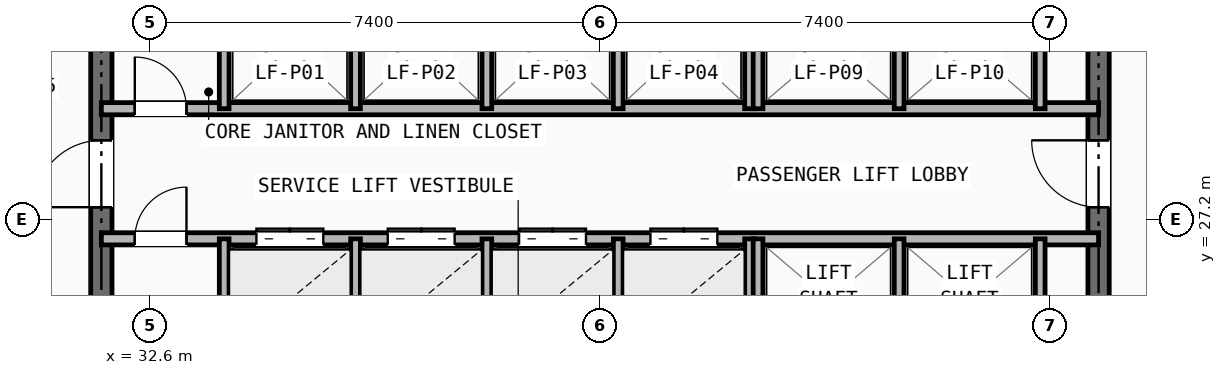
"""IFC4 building model, lengths in metres.
Left out: names, types, materials, properties, quantities, classifications, styles, units other than length and angle.
Written with IfcOpenShell. Run it as: python <this file> out.ifc"""

import sys

from ifc_helpers import new_model, si_unit, direction, frame, frame_2d, origin, place, context, subcontext, project, spatial, rectangle, extrude, element, fill, save


model = new_model("IFC4")
c1 = context("Model", 3, precision=1e-05, world=origin(), true_north=direction((0.0, 1.0)))
c2 = subcontext(c1, "Body", "Model", "MODEL_VIEW")
j1 = project(units=[si_unit("LENGTHUNIT", "METRE"), si_unit("PLANEANGLEUNIT", "RADIAN")], contexts=[c1])
p1 = place(None, origin())
s1 = spatial("IfcSite", under=j1, at=p1, CompositionType="ELEMENT")
p2 = place(p1, origin())
s2 = spatial("IfcBuilding", under=s1, at=p2, CompositionType="ELEMENT")
p3 = place(p2, frame((0.0, 0.0, 116.0)))
s3 = spatial("IfcBuildingStorey", under=s2, at=p3, CompositionType="ELEMENT", Elevation=116.0)
p4 = place(p3, frame((31.8, 16.4, 0.0), z_axis=(0.0, 0.0, 1.0), x_axis=(0.0, 1.0, 0.0)))
e1 = element("IfcWall", 1, at=p4, inside=s3, PredefinedType="SHEAR", context=c2, shape_type="SweptSolid", body=[
    extrude(rectangle(XDim=14.8, YDim=0.35, at=frame_2d((7.4, 0.0))), origin(), (0.0, 0.0, 1.0), 3.21),
])
p5 = place(p4, frame((11.0, 0.0, 0.0)))
e2 = element("IfcOpeningElement", 2, at=p5, cuts=e1, PredefinedType="OPENING", context=c2, shape_type="SweptSolid", body=[
    extrude(rectangle(XDim=1.1, YDim=2.15, at=frame_2d((0.55, 1.075))), frame((0.0, 0.185, 0.0), z_axis=(0.0, -1.0, 0.0), x_axis=(1.0, 0.0, 0.0)), (0.0, 0.0, 1.0), 0.37),
])
p6 = place(p3, frame((48.2, 16.4, 0.0), z_axis=(0.0, 0.0, 1.0), x_axis=(0.0, 1.0, 0.0)))
e3 = element("IfcWall", 3, at=p6, inside=s3, PredefinedType="SHEAR", context=c2, shape_type="SweptSolid", body=[
    extrude(rectangle(XDim=14.8, YDim=0.35, at=frame_2d((7.4, 0.0))), origin(), (0.0, 0.0, 1.0), 3.21),
])
p7 = place(p6, frame((11.0, 0.0, 0.0)))
e4 = element("IfcOpeningElement", 4, at=p7, cuts=e3, PredefinedType="OPENING", context=c2, shape_type="SweptSolid", body=[
    extrude(rectangle(XDim=1.1, YDim=2.15, at=frame_2d((0.55, 1.075))), frame((0.0, 0.185, 0.0), z_axis=(0.0, -1.0, 0.0), x_axis=(1.0, 0.0, 0.0)), (0.0, 0.0, 1.0), 0.37),
])
p8 = place(p3, frame((31.8, 29.02, 0.0), z_axis=(0.0, 0.0, 1.0), x_axis=(1.0, 0.0, 0.0)))
e5 = element("IfcWall", 5, at=p8, inside=s3, PredefinedType="SOLIDWALL", context=c2, shape_type="SweptSolid", body=[
    extrude(rectangle(XDim=16.4, YDim=0.2, at=frame_2d((8.2, 0.0))), origin(), (0.0, 0.0, 1.0), 2.661),
])
p9 = place(p8, frame((0.55, 0.0, 0.0)))
e6 = element("IfcOpeningElement", 6, at=p9, cuts=e5, PredefinedType="OPENING", context=c2, shape_type="SweptSolid", body=[
    extrude(rectangle(XDim=0.85, YDim=2.05, at=frame_2d((0.425, 1.025))), frame((0.0, 0.11, 0.0), z_axis=(0.0, -1.0, 0.0), x_axis=(1.0, 0.0, 0.0)), (0.0, 0.0, 1.0), 0.22),
])
p10 = place(p3, frame((31.8, 26.88, 0.0), z_axis=(0.0, 0.0, 1.0), x_axis=(1.0, 0.0, 0.0)))
e7 = element("IfcWall", 7, at=p10, inside=s3, PredefinedType="SOLIDWALL", context=c2, shape_type="SweptSolid", body=[
    extrude(rectangle(XDim=16.4, YDim=0.2, at=frame_2d((8.2, 0.0))), origin(), (0.0, 0.0, 1.0), 2.661),
])
p11 = place(p10, frame((0.55, 0.0, 0.0)))
e8 = element("IfcOpeningElement", 8, at=p11, cuts=e7, PredefinedType="OPENING", context=c2, shape_type="SweptSolid", body=[
    extrude(rectangle(XDim=0.85, YDim=2.05, at=frame_2d((0.425, 1.025))), frame((0.0, 0.11, 0.0), z_axis=(0.0, -1.0, 0.0), x_axis=(1.0, 0.0, 0.0)), (0.0, 0.0, 1.0), 0.22),
])
p12 = place(p10, frame((2.55, 0.0, 0.0)))
e9 = element("IfcOpeningElement", 9, at=p12, cuts=e7, PredefinedType="OPENING", context=c2, shape_type="SweptSolid", body=[
    extrude(rectangle(XDim=1.1, YDim=2.15, at=frame_2d((0.55, 1.075))), frame((0.0, 0.11, 0.0), z_axis=(0.0, -1.0, 0.0), x_axis=(1.0, 0.0, 0.0)), (0.0, 0.0, 1.0), 0.22),
])
p13 = place(p10, frame((4.71, 0.0, 0.0)))
e10 = element("IfcOpeningElement", 10, at=p13, cuts=e7, PredefinedType="OPENING", context=c2, shape_type="SweptSolid", body=[
    extrude(rectangle(XDim=1.1, YDim=2.15, at=frame_2d((0.55, 1.075))), frame((0.0, 0.11, 0.0), z_axis=(0.0, -1.0, 0.0), x_axis=(1.0, 0.0, 0.0)), (0.0, 0.0, 1.0), 0.22),
])
p14 = place(p10, frame((6.87, 0.0, 0.0)))
e11 = element("IfcOpeningElement", 11, at=p14, cuts=e7, PredefinedType="OPENING", context=c2, shape_type="SweptSolid", body=[
    extrude(rectangle(XDim=1.1, YDim=2.15, at=frame_2d((0.55, 1.075))), frame((0.0, 0.11, 0.0), z_axis=(0.0, -1.0, 0.0), x_axis=(1.0, 0.0, 0.0)), (0.0, 0.0, 1.0), 0.22),
])
p15 = place(p10, frame((9.03, 0.0, 0.0)))
e12 = element("IfcOpeningElement", 12, at=p15, cuts=e7, PredefinedType="OPENING", context=c2, shape_type="SweptSolid", body=[
    extrude(rectangle(XDim=1.1, YDim=2.15, at=frame_2d((0.55, 1.075))), frame((0.0, 0.11, 0.0), z_axis=(0.0, -1.0, 0.0), x_axis=(1.0, 0.0, 0.0)), (0.0, 0.0, 1.0), 0.22),
])
p16 = place(p3, frame((33.82, 29.02, 0.0), z_axis=(0.0, 0.0, 1.0), x_axis=(0.0, 1.0, 0.0)))
e13 = element("IfcWall", 13, at=p16, inside=s3, PredefinedType="SOLIDWALL", context=c2, shape_type="SweptSolid", body=[
    extrude(rectangle(XDim=2.18, YDim=0.16, at=frame_2d((1.09, 0.0))), origin(), (0.0, 0.0, 1.0), 2.661),
])
p17 = place(p3, frame((33.82, 24.8, 0.0), z_axis=(0.0, 0.0, 1.0), x_axis=(0.0, 1.0, 0.0)))
e14 = element("IfcWall", 14, at=p17, inside=s3, PredefinedType="SOLIDWALL", context=c2, shape_type="SweptSolid", body=[
    extrude(rectangle(XDim=2.08, YDim=0.16, at=frame_2d((1.04, 0.0))), origin(), (0.0, 0.0, 1.0), 3.21),
])
for number, where, z_axis, x_axis in (
    (15, (35.98, 29.02, 0.0), (0.0, 0.0, 1.0), (0.0, 1.0, 0.0)),
    (16, (38.14, 29.02, 0.0), (0.0, 0.0, 1.0), (0.0, 1.0, 0.0)),
    (17, (40.3, 29.02, 0.0), (0.0, 0.0, 1.0), (0.0, 1.0, 0.0)),
    (18, (42.46, 29.02, 0.0), (0.0, 0.0, 1.0), (0.0, 1.0, 0.0)),
):
    element("IfcWall", number, at=place(p3, frame(where, z_axis=z_axis, x_axis=x_axis)), inside=s3, PredefinedType="SOLIDWALL", context=c2, shape_type="SweptSolid", body=[
        extrude(rectangle(XDim=2.18, YDim=0.16, at=frame_2d((1.09, 0.0))), origin(), (0.0, 0.0, 1.0), 2.661),
    ])
for number, where, z_axis, x_axis in (
    (19, (35.98, 24.8, 0.0), (0.0, 0.0, 1.0), (0.0, 1.0, 0.0)),
    (20, (38.14, 24.8, 0.0), (0.0, 0.0, 1.0), (0.0, 1.0, 0.0)),
    (21, (40.3, 24.8, 0.0), (0.0, 0.0, 1.0), (0.0, 1.0, 0.0)),
    (22, (42.46, 24.8, 0.0), (0.0, 0.0, 1.0), (0.0, 1.0, 0.0)),
):
    element("IfcWall", number, at=place(p3, frame(where, z_axis=z_axis, x_axis=x_axis)), inside=s3, PredefinedType="SOLIDWALL", context=c2, shape_type="SweptSolid", body=[
        extrude(rectangle(XDim=2.08, YDim=0.16, at=frame_2d((1.04, 0.0))), origin(), (0.0, 0.0, 1.0), 3.21),
    ])
for number, where, z_axis, x_axis in (
    (23, (42.6, 29.02, 0.0), (0.0, 0.0, 1.0), (0.0, 1.0, 0.0)),
    (24, (44.92, 29.02, 0.0), (0.0, 0.0, 1.0), (0.0, 1.0, 0.0)),
    (25, (47.24, 29.02, 0.0), (0.0, 0.0, 1.0), (0.0, 1.0, 0.0)),
):
    element("IfcWall", number, at=place(p3, frame(where, z_axis=z_axis, x_axis=x_axis)), inside=s3, PredefinedType="SOLIDWALL", context=c2, shape_type="SweptSolid", body=[
        extrude(rectangle(XDim=2.18, YDim=0.16, at=frame_2d((1.09, 0.0))), origin(), (0.0, 0.0, 1.0), 2.661),
    ])
for number, where, z_axis, x_axis in (
    (26, (42.6, 24.8, 0.0), (0.0, 0.0, 1.0), (0.0, 1.0, 0.0)),
    (27, (44.92, 24.8, 0.0), (0.0, 0.0, 1.0), (0.0, 1.0, 0.0)),
    (28, (47.24, 24.8, 0.0), (0.0, 0.0, 1.0), (0.0, 1.0, 0.0)),
):
    element("IfcWall", number, at=place(p3, frame(where, z_axis=z_axis, x_axis=x_axis)), inside=s3, PredefinedType="SOLIDWALL", context=c2, shape_type="SweptSolid", body=[
        extrude(rectangle(XDim=2.08, YDim=0.16, at=frame_2d((1.04, 0.0))), origin(), (0.0, 0.0, 1.0), 3.21),
    ])
p18 = place(p9, origin())
e29 = element("IfcDoor", 29, at=p18, inside=s3, OperationType="SINGLE_SWING_LEFT", PredefinedType="DOOR", context=c2, shape_type="SweptSolid", body=[
    extrude(rectangle(XDim=0.85, YDim=2.05, at=frame_2d((0.425, 1.025))), frame((0.0, 0.025, 0.0), z_axis=(0.0, -1.0, 0.0), x_axis=(1.0, 0.0, 0.0)), (0.0, 0.0, 1.0), 0.05),
])
fill(e6, e29)
p19 = place(p11, origin())
e30 = element("IfcDoor", 30, at=p19, inside=s3, OperationType="SINGLE_SWING_RIGHT", PredefinedType="DOOR", context=c2, shape_type="SweptSolid", body=[
    extrude(rectangle(XDim=0.85, YDim=2.05, at=frame_2d((0.425, 1.025))), frame((0.0, 0.025, 0.0), z_axis=(0.0, -1.0, 0.0), x_axis=(1.0, 0.0, 0.0)), (0.0, 0.0, 1.0), 0.05),
])
fill(e8, e30)
p20 = place(p5, origin())
e31 = element("IfcDoor", 31, at=p20, inside=s3, OperationType="SINGLE_SWING_LEFT", PredefinedType="DOOR", context=c2, shape_type="SweptSolid", body=[
    extrude(rectangle(XDim=1.1, YDim=2.15, at=frame_2d((0.55, 1.075))), frame((0.0, 0.025, 0.0), z_axis=(0.0, -1.0, 0.0), x_axis=(1.0, 0.0, 0.0)), (0.0, 0.0, 1.0), 0.05),
])
fill(e2, e31)
p21 = place(p7, origin())
e32 = element("IfcDoor", 32, at=p21, inside=s3, OperationType="SINGLE_SWING_RIGHT", PredefinedType="DOOR", context=c2, shape_type="SweptSolid", body=[
    extrude(rectangle(XDim=1.1, YDim=2.15, at=frame_2d((0.55, 1.075))), frame((0.0, 0.025, 0.0), z_axis=(0.0, -1.0, 0.0), x_axis=(1.0, 0.0, 0.0)), (0.0, 0.0, 1.0), 0.05),
])
fill(e4, e32)
p22 = place(p12, origin())
e33 = element("IfcDoor", 33, at=p22, inside=s3, OperationType="DOUBLE_DOOR_SLIDING", PredefinedType="DOOR", context=c2, shape_type="SweptSolid", body=[
    extrude(rectangle(XDim=1.1, YDim=2.15, at=frame_2d((0.55, 1.075))), frame((0.0, 0.025, 0.0), z_axis=(0.0, -1.0, 0.0), x_axis=(1.0, 0.0, 0.0)), (0.0, 0.0, 1.0), 0.05),
])
fill(e9, e33)
p23 = place(p13, origin())
e34 = element("IfcDoor", 34, at=p23, inside=s3, OperationType="DOUBLE_DOOR_SLIDING", PredefinedType="DOOR", context=c2, shape_type="SweptSolid", body=[
    extrude(rectangle(XDim=1.1, YDim=2.15, at=frame_2d((0.55, 1.075))), frame((0.0, 0.025, 0.0), z_axis=(0.0, -1.0, 0.0), x_axis=(1.0, 0.0, 0.0)), (0.0, 0.0, 1.0), 0.05),
])
fill(e10, e34)
p24 = place(p14, origin())
e35 = element("IfcDoor", 35, at=p24, inside=s3, OperationType="DOUBLE_DOOR_SLIDING", PredefinedType="DOOR", context=c2, shape_type="SweptSolid", body=[
    extrude(rectangle(XDim=1.1, YDim=2.15, at=frame_2d((0.55, 1.075))), frame((0.0, 0.025, 0.0), z_axis=(0.0, -1.0, 0.0), x_axis=(1.0, 0.0, 0.0)), (0.0, 0.0, 1.0), 0.05),
])
fill(e11, e35)
p25 = place(p15, origin())
e36 = element("IfcDoor", 36, at=p25, inside=s3, OperationType="DOUBLE_DOOR_SLIDING", PredefinedType="DOOR", context=c2, shape_type="SweptSolid", body=[
    extrude(rectangle(XDim=1.1, YDim=2.15, at=frame_2d((0.55, 1.075))), frame((0.0, 0.025, 0.0), z_axis=(0.0, -1.0, 0.0), x_axis=(1.0, 0.0, 0.0)), (0.0, 0.0, 1.0), 0.05),
])
fill(e12, e36)
save(model, sys.argv[1])
